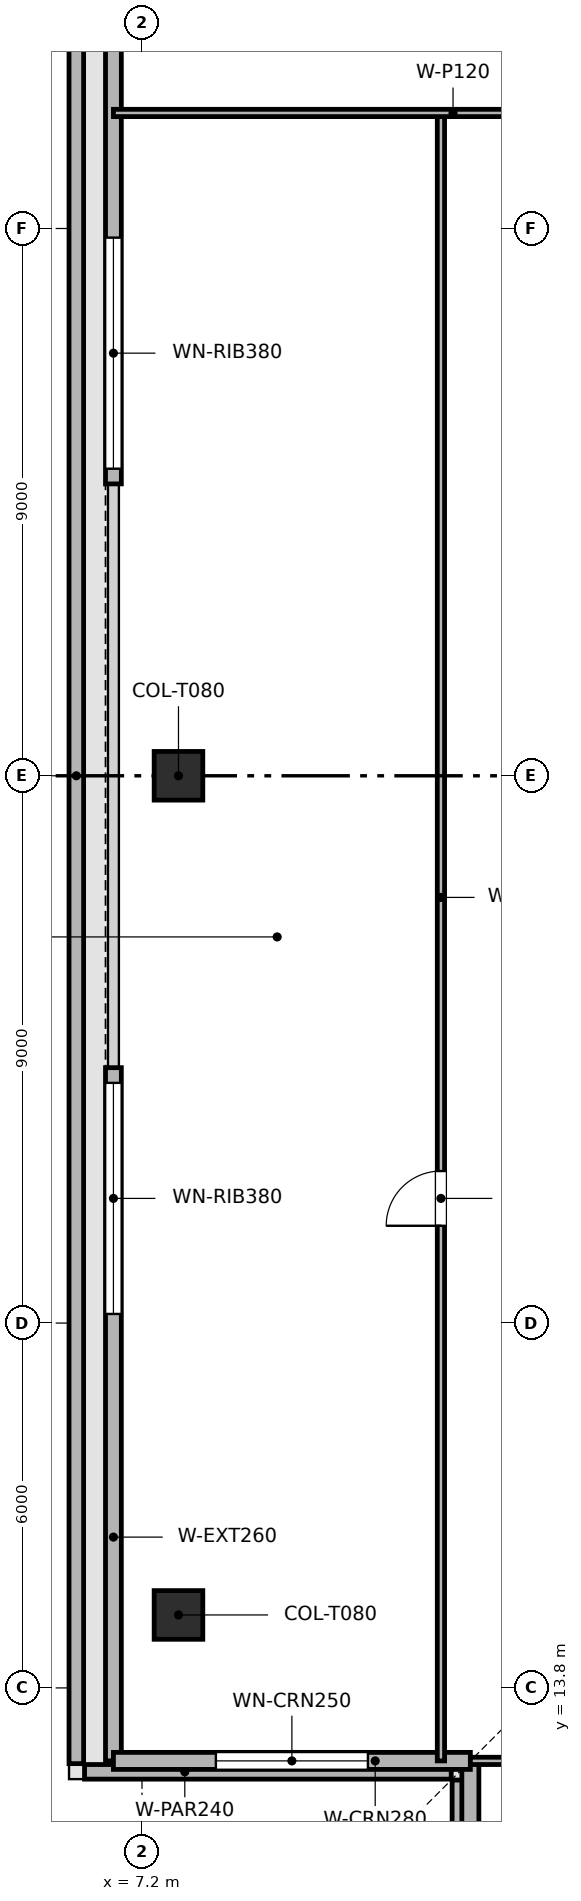
"""IFC4 building model, lengths in metres.
Left out: names, types, materials, properties, quantities, classifications, styles, units other than length and angle.
Written with IfcOpenShell. Run it as: python <this file> out.ifc"""

import sys

from ifc_helpers import new_model, si_unit, direction, frame, frame_2d, origin, origin_2d, place, context, subcontext, project, spatial, rectangle, extrude, element, fill, save


model = new_model("IFC4")
c1 = context("Model", 3, precision=1e-05, world=origin(), true_north=direction((0.0, 1.0)))
c2 = subcontext(c1, "Body", "Model", "MODEL_VIEW")
j1 = project(units=[si_unit("LENGTHUNIT", "METRE"), si_unit("PLANEANGLEUNIT", "RADIAN")], contexts=[c1])
p1 = place(None, origin())
s1 = spatial("IfcSite", under=j1, at=p1, CompositionType="ELEMENT")
p2 = place(p1, origin())
s2 = spatial("IfcBuilding", under=s1, at=p2, CompositionType="ELEMENT")
p3 = place(p2, frame((0.0, 0.0, 333.0)))
s3 = spatial("IfcBuildingStorey", under=s2, at=p3, CompositionType="ELEMENT", Elevation=333.0)
for number, where, z_axis, x_axis in (
    (1, (7.8, 28.8, 0.003), (0.0, 0.0, 1.0), (1.0, 0.0, 0.0)),
    (2, (7.8, 15.0, 0.003), (0.0, 0.0, 1.0), (1.0, 0.0, 0.0)),
):
    element("IfcColumn", number, at=place(p3, frame(where, z_axis=z_axis, x_axis=x_axis)), inside=s3, PredefinedType="COLUMN", context=c2, shape_type="SweptSolid", body=[
        extrude(rectangle(XDim=0.8, YDim=0.8, at=origin_2d()), origin(), (0.0, 0.0, 1.0), 3.504),
    ])
p4 = place(p3, frame((6.12, 45.045, 0.0), z_axis=(0.0, 0.0, 1.0), x_axis=(0.0, -1.0, 0.0)))
e3 = element("IfcWall", 3, at=p4, inside=s3, PredefinedType="PARAPET", context=c2, shape_type="SweptSolid", body=[
    extrude(rectangle(XDim=32.49, YDim=0.24, at=frame_2d((16.245, 0.0))), origin(), (0.0, 0.0, 1.0), 1.2),
])
for number, where, z_axis, x_axis in (
    (4, (6.255, 12.42, 0.0), (0.0, 0.0, 1.0), (1.0, 0.0, 0.0)),
    (5, (12.42, 12.285, 0.0), (0.0, 0.0, 1.0), (0.0, -1.0, 0.0)),
):
    element("IfcWall", number, at=place(p3, frame(where, z_axis=z_axis, x_axis=x_axis)), inside=s3, PredefinedType="PARAPET", context=c2, shape_type="SweptSolid", body=[
        extrude(rectangle(XDim=6.03, YDim=0.24, at=frame_2d((3.015, 0.0))), origin(), (0.0, 0.0, 1.0), 1.2),
    ])
p5 = place(p3, frame((6.73, 12.6, 0.0), z_axis=(0.0, 0.0, 1.0), x_axis=(0.0, 1.0, 0.0)))
e6 = element("IfcWall", 6, at=p5, inside=s3, PredefinedType="SOLIDWALL", context=c2, shape_type="SweptSolid", body=[
    extrude(rectangle(XDim=11.4, YDim=0.26, at=frame_2d((5.7, 0.0))), origin(), (0.0, 0.0, 1.0), 3.51),
])
p6 = place(p5, frame((7.35, 0.0, 0.9)))
e7 = element("IfcOpeningElement", 7, at=p6, cuts=e6, PredefinedType="OPENING", context=c2, shape_type="SweptSolid", body=[
    extrude(rectangle(XDim=3.8, YDim=1.9, at=frame_2d((1.9, 0.95))), frame((0.0, 0.14, 0.0), z_axis=(0.0, -1.0, 0.0), x_axis=(1.0, 0.0, 0.0)), (0.0, 0.0, 1.0), 0.28),
])
p7 = place(p3, frame((6.73, 33.6, 0.0), z_axis=(0.0, 0.0, 1.0), x_axis=(0.0, 1.0, 0.0)))
e8 = element("IfcWall", 8, at=p7, inside=s3, PredefinedType="SOLIDWALL", context=c2, shape_type="SweptSolid", body=[
    extrude(rectangle(XDim=11.4, YDim=0.26, at=frame_2d((5.7, 0.0))), origin(), (0.0, 0.0, 1.0), 3.51),
])
p8 = place(p7, frame((0.25, 0.0, 0.9)))
e9 = element("IfcOpeningElement", 9, at=p8, cuts=e8, PredefinedType="OPENING", context=c2, shape_type="SweptSolid", body=[
    extrude(rectangle(XDim=3.8, YDim=1.9, at=frame_2d((1.9, 0.95))), frame((0.0, 0.14, 0.0), z_axis=(0.0, -1.0, 0.0), x_axis=(1.0, 0.0, 0.0)), (0.0, 0.0, 1.0), 0.28),
])
p9 = place(p3, frame((12.6, 6.73, 0.0), z_axis=(0.0, 0.0, 1.0), x_axis=(0.0, 1.0, 0.0)))
e10 = element("IfcWall", 10, at=p9, inside=s3, PredefinedType="SOLIDWALL", context=c2, shape_type="SweptSolid", body=[
    extrude(rectangle(XDim=5.87, YDim=0.28, at=frame_2d((2.935, 0.0))), origin(), (0.0, 0.0, 1.0), 3.51),
])
p10 = place(p9, frame((1.685, 0.0, 0.9)))
e11 = element("IfcOpeningElement", 11, at=p10, cuts=e10, PredefinedType="OPENING", context=c2, shape_type="SweptSolid", body=[
    extrude(rectangle(XDim=2.5, YDim=1.9, at=frame_2d((1.25, 0.95))), frame((0.0, 0.15, 0.0), z_axis=(0.0, -1.0, 0.0), x_axis=(1.0, 0.0, 0.0)), (0.0, 0.0, 1.0), 0.3),
])
p11 = place(p3, frame((12.6, 12.6, 0.0), z_axis=(0.0, 0.0, 1.0), x_axis=(-1.0, 0.0, 0.0)))
e12 = element("IfcWall", 12, at=p11, inside=s3, PredefinedType="SOLIDWALL", context=c2, shape_type="SweptSolid", body=[
    extrude(rectangle(XDim=5.87, YDim=0.28, at=frame_2d((2.935, 0.0))), origin(), (0.0, 0.0, 1.0), 3.51),
])
p12 = place(p11, frame((1.685, 0.0, 0.9)))
e13 = element("IfcOpeningElement", 13, at=p12, cuts=e12, PredefinedType="OPENING", context=c2, shape_type="SweptSolid", body=[
    extrude(rectangle(XDim=2.5, YDim=1.9, at=frame_2d((1.25, 0.95))), frame((0.0, 0.15, 0.0), z_axis=(0.0, -1.0, 0.0), x_axis=(1.0, 0.0, 0.0)), (0.0, 0.0, 1.0), 0.3),
])
p13 = place(p3, frame((12.116, 12.6, 0.0), z_axis=(0.0, 0.0, 1.0), x_axis=(0.0, 1.0, 0.0)))
e14 = element("IfcWall", 14, at=p13, inside=s3, PredefinedType="PARTITIONING", context=c2, shape_type="SweptSolid", body=[
    extrude(rectangle(XDim=27.1, YDim=0.12, at=frame_2d((13.55, 0.0))), origin(), (0.0, 0.0, 1.0), 3.095),
])
p14 = place(p13, frame((8.8, 0.0, 0.0)))
e15 = element("IfcOpeningElement", 15, at=p14, cuts=e14, PredefinedType="OPENING", context=c2, shape_type="SweptSolid", body=[
    extrude(rectangle(XDim=0.9, YDim=2.1, at=frame_2d((0.45, 1.05))), frame((0.0, 0.07, 0.0), z_axis=(0.0, -1.0, 0.0), x_axis=(1.0, 0.0, 0.0)), (0.0, 0.0, 1.0), 0.14),
])
p15 = place(p3, frame((12.6, 12.6, 0.0), z_axis=(0.0, 0.0, 1.0), x_axis=(1.0, 0.0, 0.0)))
e16 = element("IfcWall", 16, at=p15, inside=s3, PredefinedType="PARTITIONING", context=c2, shape_type="SweptSolid", body=[
    extrude(rectangle(XDim=5.3, YDim=0.12, at=frame_2d((2.65, 0.0))), origin(), (0.0, 0.0, 1.0), 3.195),
])
p16 = place(p3, frame((6.73, 39.7, 0.0), z_axis=(0.0, 0.0, 1.0), x_axis=(1.0, 0.0, 0.0)))
e17 = element("IfcWall", 17, at=p16, inside=s3, PredefinedType="PARTITIONING", context=c2, shape_type="SweptSolid", body=[
    extrude(rectangle(XDim=11.17, YDim=0.12, at=frame_2d((5.585, 0.0))), origin(), (0.0, 0.0, 1.0), 3.095),
])
p17 = place(p6, origin())
e18 = element("IfcWindow", 18, at=p17, inside=s3, PartitioningType="SINGLE_PANEL", PredefinedType="WINDOW", context=c2, shape_type="SweptSolid", body=[
    extrude(rectangle(XDim=3.8, YDim=1.9, at=frame_2d((1.9, 0.95))), frame((0.0, 0.03, 0.0), z_axis=(0.0, -1.0, 0.0), x_axis=(1.0, 0.0, 0.0)), (0.0, 0.0, 1.0), 0.06),
])
fill(e7, e18)
p18 = place(p8, origin())
e19 = element("IfcWindow", 19, at=p18, inside=s3, PartitioningType="SINGLE_PANEL", PredefinedType="WINDOW", context=c2, shape_type="SweptSolid", body=[
    extrude(rectangle(XDim=3.8, YDim=1.9, at=frame_2d((1.9, 0.95))), frame((0.0, 0.03, 0.0), z_axis=(0.0, -1.0, 0.0), x_axis=(1.0, 0.0, 0.0)), (0.0, 0.0, 1.0), 0.06),
])
fill(e9, e19)
p19 = place(p12, origin())
e20 = element("IfcWindow", 20, at=p19, inside=s3, PartitioningType="SINGLE_PANEL", PredefinedType="WINDOW", context=c2, shape_type="SweptSolid", body=[
    extrude(rectangle(XDim=2.5, YDim=1.9, at=frame_2d((1.25, 0.95))), frame((0.0, 0.03, 0.0), z_axis=(0.0, -1.0, 0.0), x_axis=(1.0, 0.0, 0.0)), (0.0, 0.0, 1.0), 0.06),
])
fill(e13, e20)
p20 = place(p14, origin())
e21 = element("IfcDoor", 21, at=p20, inside=s3, OperationType="SINGLE_SWING_LEFT", PredefinedType="DOOR", context=c2, shape_type="SweptSolid", body=[
    extrude(rectangle(XDim=0.9, YDim=2.1, at=frame_2d((0.45, 1.05))), frame((0.0, 0.025, 0.0), z_axis=(0.0, -1.0, 0.0), x_axis=(1.0, 0.0, 0.0)), (0.0, 0.0, 1.0), 0.05),
])
fill(e15, e21)
save(model, sys.argv[1])
